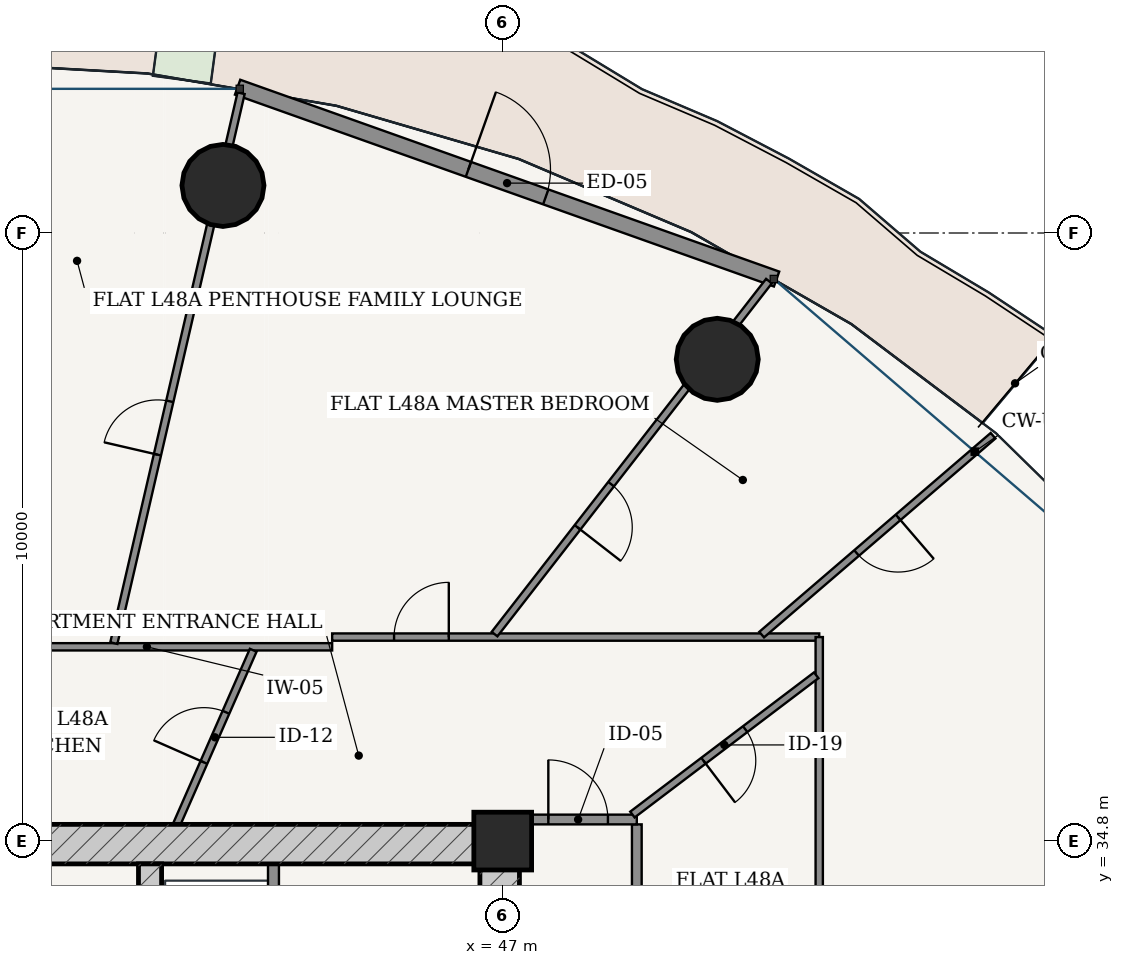
"""IFC4 building model, lengths in metres.
Left out: names, types, materials, properties, quantities, classifications, styles, units other than length and angle.
Written with IfcOpenShell. Run it as: python <this file> out.ifc"""

import sys

from ifc_helpers import new_model, si_unit, direction, frame, frame_2d, origin, origin_2d, place, context, subcontext, project, spatial, rectangle, hollow_circle, extrude, source, transform, mapped, element, fill, save


model = new_model("IFC4")
c1 = context("Model", 3, precision=1e-05, world=origin(), true_north=direction((-0.2419218956, 0.970295726276)))
c2 = subcontext(c1, "Body", "Model", "MODEL_VIEW")
j1 = project(units=[si_unit("LENGTHUNIT", "METRE"), si_unit("PLANEANGLEUNIT", "RADIAN")], contexts=[c1])
p1 = place(None, origin())
s1 = spatial("IfcSite", under=j1, at=p1, CompositionType="ELEMENT")
p2 = place(p1, origin())
s2 = spatial("IfcBuilding", under=s1, at=p2, CompositionType="ELEMENT")
p3 = place(p2, frame((0.0, 0.0, 182.2)))
s3 = spatial("IfcBuildingStorey", under=s2, at=p3, CompositionType="ELEMENT", Elevation=182.2)
p4 = place(p3, frame((47.0, 34.8, 0.0), z_axis=(0.0, 0.0, 1.0), x_axis=(1.0, 0.0, 0.0)))
e1 = element("IfcColumn", 1, at=p4, inside=s3, PredefinedType="COLUMN", context=c2, shape_type="SweptSolid", body=[
    extrude(rectangle(XDim=0.95, YDim=0.95, at=origin_2d()), origin(), (0.0, 0.0, 1.0), 3.6),
])
p5 = place(p3, frame((28.725, 34.75, 0.0), z_axis=(0.0, 0.0, 1.0), x_axis=(1.0, 0.0, 0.0)))
e2 = element("IfcWall", 2, at=p5, inside=s3, PredefinedType="SHEAR", context=c2, shape_type="SweptSolid", body=[
    extrude(rectangle(XDim=18.55, YDim=0.65, at=frame_2d((9.275, 0.0))), origin(), (0.0, 0.0, 1.0), 3.15),
])
p6 = place(p3, frame((46.95, 19.175, 0.0), z_axis=(0.0, 0.0, 1.0), x_axis=(0.0, 1.0, 0.0)))
e3 = element("IfcWall", 3, at=p6, inside=s3, PredefinedType="SHEAR", context=c2, shape_type="SweptSolid", body=[
    extrude(rectangle(XDim=15.25, YDim=0.65, at=frame_2d((7.625, 0.0))), origin(), (0.0, 0.0, 1.0), 3.15),
])
p7 = place(p6, frame((9.875, 0.0, 0.0)))
e4 = element("IfcOpeningElement", 4, at=p7, cuts=e3, PredefinedType="OPENING", context=c2, shape_type="SweptSolid", body=[
    extrude(rectangle(XDim=1.5, YDim=2.2, at=frame_2d((0.75, 1.1))), frame((0.0, 0.335, 0.0), z_axis=(0.0, -1.0, 0.0), x_axis=(1.0, 0.0, 0.0)), (0.0, 0.0, 1.0), 0.67),
])
p8 = place(p3, frame((41.2, 19.175, 0.0), z_axis=(0.0, 0.0, 1.0), x_axis=(0.0, 1.0, 0.0)))
e5 = element("IfcWall", 5, at=p8, inside=s3, PredefinedType="SHEAR", context=c2, shape_type="SweptSolid", body=[
    extrude(rectangle(XDim=15.25, YDim=0.38, at=frame_2d((7.625, 0.0))), origin(), (0.0, 0.0, 1.0), 3.15),
])
p9 = place(p8, frame((7.8, 0.0, 0.0)))
e6 = element("IfcOpeningElement", 6, at=p9, cuts=e5, PredefinedType="OPENING", context=c2, shape_type="SweptSolid", body=[
    extrude(rectangle(XDim=1.05, YDim=2.15, at=frame_2d((0.525, 1.075))), frame((0.0, 0.2, 0.0), z_axis=(0.0, -1.0, 0.0), x_axis=(1.0, 0.0, 0.0)), (0.0, 0.0, 1.0), 0.4),
])
for number, where, z_axis, x_axis in (
    (7, (50.528, 42.723, 0.0), (0.0, 0.0, 1.0), (1.0, 0.0, 0.0)),
    (8, (42.399, 45.582, 0.0), (0.0, 0.0, 1.0), (1.0, 0.0, 0.0)),
):
    element("IfcColumn", number, at=place(p3, frame(where, z_axis=z_axis, x_axis=x_axis)), inside=s3, PredefinedType="COLUMN", context=c2, shape_type="SweptSolid", body=[
        extrude(hollow_circle(Radius=0.675, WallThickness=0.042, at=origin_2d()), origin(), (0.0, 0.0, 1.0), 3.6),
    ])
p10 = place(p3, frame((51.503, 44.043, 0.0), z_axis=(0.0, 0.0, 1.0), x_axis=(-0.942095406405, 0.335344964522, 0.0)))
e9 = element("IfcWall", 9, at=p10, inside=s3, PredefinedType="SOLIDWALL", context=c2, shape_type="SweptSolid", body=[
    extrude(rectangle(XDim=9.408, YDim=0.26, at=frame_2d((4.704, 0.0))), origin(), (0.0, 0.0, 1.0), 3.15),
])
p11 = place(p10, frame((4.029, 0.0, 0.0)))
e10 = element("IfcOpeningElement", 10, at=p11, cuts=e9, PredefinedType="OPENING", context=c2, shape_type="SweptSolid", body=[
    extrude(rectangle(XDim=1.35, YDim=2.2, at=frame_2d((0.675, 1.1))), frame((0.0, 0.14, 0.0), z_axis=(0.0, -1.0, 0.0), x_axis=(1.0, 0.0, 0.0)), (0.0, 0.0, 1.0), 0.28),
])
p12 = place(p3, frame((43.23, 28.52, 0.0), z_axis=(0.0, 0.0, 1.0), x_axis=(0.0, 1.0, 0.0)))
e11 = element("IfcWall", 11, at=p12, inside=s3, PredefinedType="PARTITIONING", context=c2, shape_type="SweptSolid", body=[
    extrude(rectangle(XDim=5.905, YDim=0.18, at=frame_2d((2.953, 0.0))), origin(), (0.0, 0.0, 1.0), 3.15),
])
p13 = place(p12, frame((0.905, 0.0, 0.0)))
e12 = element("IfcOpeningElement", 12, at=p13, cuts=e11, PredefinedType="OPENING", context=c2, shape_type="SweptSolid", body=[
    extrude(rectangle(XDim=0.85, YDim=2.1, at=frame_2d((0.425, 1.05))), frame((0.0, 0.1, 0.0), z_axis=(0.0, -1.0, 0.0), x_axis=(1.0, 0.0, 0.0)), (0.0, 0.0, 1.0), 0.2),
])
p14 = place(p12, frame((3.655, 0.0, 0.0)))
e13 = element("IfcOpeningElement", 13, at=p14, cuts=e11, PredefinedType="OPENING", context=c2, shape_type="SweptSolid", body=[
    extrude(rectangle(XDim=1.15, YDim=2.2, at=frame_2d((0.575, 1.1))), frame((0.0, 0.1, 0.0), z_axis=(0.0, -1.0, 0.0), x_axis=(1.0, 0.0, 0.0)), (0.0, 0.0, 1.0), 0.2),
])
p15 = place(p3, frame((49.205, 16.675, 0.0), z_axis=(0.0, 0.0, 1.0), x_axis=(0.0, 1.0, 0.0)))
e14 = element("IfcWall", 14, at=p15, inside=s3, PredefinedType="PARTITIONING", context=c2, shape_type="SweptSolid", body=[
    extrude(rectangle(XDim=18.4, YDim=0.16, at=frame_2d((9.2, 0.0))), origin(), (0.0, 0.0, 1.0), 2.666),
])
p16 = place(p3, frame((47.275, 35.155, 0.0), z_axis=(0.0, 0.0, 1.0), x_axis=(1.0, 0.0, 0.0)))
e15 = element("IfcWall", 15, at=p16, inside=s3, PredefinedType="PARTITIONING", context=c2, shape_type="SweptSolid", body=[
    extrude(rectangle(XDim=1.93, YDim=0.16, at=frame_2d((0.965, 0.0))), origin(), (0.0, 0.0, 1.0), 3.15),
])
p17 = place(p16, frame((0.475, 0.0, 0.0)))
e16 = element("IfcOpeningElement", 16, at=p17, cuts=e15, PredefinedType="OPENING", context=c2, shape_type="SweptSolid", body=[
    extrude(rectangle(XDim=0.98, YDim=2.2, at=frame_2d((0.49, 1.1))), frame((0.0, 0.09, 0.0), z_axis=(0.0, -1.0, 0.0), x_axis=(1.0, 0.0, 0.0)), (0.0, 0.0, 1.0), 0.18),
])
p18 = place(p3, frame((38.102, 37.995, 0.0), z_axis=(0.0, 0.0, 1.0), x_axis=(1.0, 0.0, 0.0)))
e17 = element("IfcWall", 17, at=p18, inside=s3, PredefinedType="PARTITIONING", context=c2, shape_type="SweptSolid", body=[
    extrude(rectangle(XDim=6.093, YDim=0.12, at=frame_2d((3.046, 0.0))), origin(), (0.0, 0.0, 1.0), 2.666),
])
p19 = place(p3, frame((44.195, 38.155, 0.0), z_axis=(0.0, 0.0, 1.0), x_axis=(1.0, 0.0, 0.0)))
e18 = element("IfcWall", 18, at=p19, inside=s3, PredefinedType="PARTITIONING", context=c2, shape_type="SweptSolid", body=[
    extrude(rectangle(XDim=8.01, YDim=0.12, at=frame_2d((4.005, 0.0))), origin(), (0.0, 0.0, 1.0), 2.666),
])
p20 = place(p19, frame((1.018, 0.0, 0.0)))
e19 = element("IfcOpeningElement", 19, at=p20, cuts=e18, PredefinedType="OPENING", context=c2, shape_type="SweptSolid", body=[
    extrude(rectangle(XDim=0.9, YDim=2.15, at=frame_2d((0.45, 1.075))), frame((0.0, 0.07, 0.0), z_axis=(0.0, -1.0, 0.0), x_axis=(1.0, 0.0, 0.0)), (0.0, 0.0, 1.0), 0.14),
])
p21 = place(p3, frame((52.205, 38.155, 0.0), z_axis=(0.0, 0.0, 1.0), x_axis=(0.0, -1.0, 0.0)))
e20 = element("IfcWall", 20, at=p21, inside=s3, PredefinedType="PARTITIONING", context=c2, shape_type="SweptSolid", body=[
    extrude(rectangle(XDim=16.31, YDim=0.12, at=frame_2d((8.155, 0.0))), origin(), (0.0, 0.0, 1.0), 2.666),
])
p22 = place(p21, frame((13.574, 0.0, 0.0)))
e21 = element("IfcOpeningElement", 21, at=p22, cuts=e20, PredefinedType="OPENING", context=c2, shape_type="SweptSolid", body=[
    extrude(rectangle(XDim=0.9, YDim=2.15, at=frame_2d((0.45, 1.075))), frame((0.0, 0.07, 0.0), z_axis=(0.0, -1.0, 0.0), x_axis=(1.0, 0.0, 0.0)), (0.0, 0.0, 1.0), 0.14),
])
p23 = place(p21, frame((8.518, 0.0, 0.0)))
e22 = element("IfcOpeningElement", 22, at=p23, cuts=e20, PredefinedType="OPENING", context=c2, shape_type="SweptSolid", body=[
    extrude(rectangle(XDim=0.9, YDim=2.15, at=frame_2d((0.45, 1.075))), frame((0.0, 0.07, 0.0), z_axis=(0.0, -1.0, 0.0), x_axis=(1.0, 0.0, 0.0)), (0.0, 0.0, 1.0), 0.14),
])
p24 = place(p3, frame((51.258, 38.195, 0.0), z_axis=(0.0, 0.0, 1.0), x_axis=(0.758369880373, 0.651824458381, 0.0)))
e23 = element("IfcWall", 23, at=p24, inside=s3, PredefinedType="PARTITIONING", context=c2, shape_type="SweptSolid", body=[
    extrude(rectangle(XDim=5.018, YDim=0.12, at=frame_2d((2.509, 0.0))), origin(), (0.0, 0.0, 1.0), 2.666),
])
p25 = place(p24, frame((2.059, 0.0, 0.0)))
e24 = element("IfcOpeningElement", 24, at=p25, cuts=e23, PredefinedType="OPENING", context=c2, shape_type="SweptSolid", body=[
    extrude(rectangle(XDim=0.9, YDim=2.15, at=frame_2d((0.45, 1.075))), frame((0.0, 0.07, 0.0), z_axis=(0.0, -1.0, 0.0), x_axis=(1.0, 0.0, 0.0)), (0.0, 0.0, 1.0), 0.14),
])
p26 = place(p3, frame((46.865, 38.204, 0.0), z_axis=(0.0, 0.0, 1.0), x_axis=(0.613754405153, 0.789497010859, 0.0)))
e25 = element("IfcWall", 25, at=p26, inside=s3, PredefinedType="PARTITIONING", context=c2, shape_type="SweptSolid", body=[
    extrude(rectangle(XDim=7.353, YDim=0.12, at=frame_2d((3.677, 0.0))), origin(), (0.0, 0.0, 1.0), 2.5),
])
p27 = place(p26, frame((2.224, 0.0, 0.0)))
e26 = element("IfcOpeningElement", 26, at=p27, cuts=e25, PredefinedType="OPENING", context=c2, shape_type="SweptSolid", body=[
    extrude(rectangle(XDim=0.9, YDim=2.15, at=frame_2d((0.45, 1.075))), frame((0.0, 0.07, 0.0), z_axis=(0.0, -1.0, 0.0), x_axis=(1.0, 0.0, 0.0)), (0.0, 0.0, 1.0), 0.14),
])
p28 = place(p3, frame((40.605, 38.055, 0.0), z_axis=(0.0, 0.0, 1.0), x_axis=(0.225466493239, 0.974250922723, 0.0)))
e27 = element("IfcWall", 27, at=p28, inside=s3, PredefinedType="PARTITIONING", context=c2, shape_type="SweptSolid", body=[
    extrude(rectangle(XDim=9.282, YDim=0.12, at=frame_2d((4.641, 0.0))), origin(), (0.0, 0.0, 1.0), 2.5),
])
p29 = place(p28, frame((3.182, 0.0, 0.0)))
e28 = element("IfcOpeningElement", 28, at=p29, cuts=e27, PredefinedType="OPENING", context=c2, shape_type="SweptSolid", body=[
    extrude(rectangle(XDim=0.9, YDim=2.15, at=frame_2d((0.45, 1.075))), frame((0.0, 0.07, 0.0), z_axis=(0.0, -1.0, 0.0), x_axis=(1.0, 0.0, 0.0)), (0.0, 0.0, 1.0), 0.14),
])
p30 = place(p3, frame((49.133, 35.236, 0.0), z_axis=(0.0, 0.0, 1.0), x_axis=(0.797054583929, 0.603907269568, 0.0)))
e29 = element("IfcWall", 29, at=p30, inside=s3, PredefinedType="PARTITIONING", context=c2, shape_type="SweptSolid", body=[
    extrude(rectangle(XDim=3.792, YDim=0.12, at=frame_2d((1.896, 0.0))), origin(), (0.0, 0.0, 1.0), 2.825),
])
p31 = place(p30, frame((1.466, 0.0, 0.0)))
e30 = element("IfcOpeningElement", 30, at=p31, cuts=e29, PredefinedType="OPENING", context=c2, shape_type="SweptSolid", body=[
    extrude(rectangle(XDim=0.86, YDim=2.15, at=frame_2d((0.43, 1.075))), frame((0.0, 0.07, 0.0), z_axis=(0.0, -1.0, 0.0), x_axis=(1.0, 0.0, 0.0)), (0.0, 0.0, 1.0), 0.14),
])
p32 = place(p3, frame((41.638, 35.075, 0.0), z_axis=(0.0, 0.0, 1.0), x_axis=(0.402456087228, 0.915439292282, 0.0)))
e31 = element("IfcWall", 31, at=p32, inside=s3, PredefinedType="PARTITIONING", context=c2, shape_type="SweptSolid", body=[
    extrude(rectangle(XDim=3.128, YDim=0.12, at=frame_2d((1.564, 0.0))), origin(), (0.0, 0.0, 1.0), 3.15),
])
p33 = place(p32, frame((1.114, 0.0, 0.0)))
e32 = element("IfcOpeningElement", 32, at=p33, cuts=e31, PredefinedType="OPENING", context=c2, shape_type="SweptSolid", body=[
    extrude(rectangle(XDim=0.9, YDim=2.15, at=frame_2d((0.45, 1.075))), frame((0.0, 0.07, 0.0), z_axis=(0.0, -1.0, 0.0), x_axis=(1.0, 0.0, 0.0)), (0.0, 0.0, 1.0), 0.14),
])
m1 = source(origin(), c2, "Body", "SweptSolid", [
    extrude(rectangle(XDim=1.35, YDim=2.2, at=frame_2d((0.675, 1.1))), frame((0.0, 0.025, 0.0), z_axis=(0.0, -1.0, 0.0), x_axis=(1.0, 0.0, 0.0)), (0.0, 0.0, 1.0), 0.05),
])
p34 = place(p11, frame((1.35, 0.0, 0.0), z_axis=(0.0, 0.0, 1.0), x_axis=(-1.0, 0.0, 0.0)))
e33 = element("IfcDoor", 33, at=p34, inside=s3, OperationType="SINGLE_SWING_LEFT", PredefinedType="DOOR", context=c2, shape_type="MappedRepresentation", body=[
    mapped(m1, transform((0.0, 0.0, 0.0), scale=1.0)),
])
fill(e10, e33)
m2 = source(origin(), c2, "Body", "SweptSolid", [
    extrude(rectangle(XDim=0.98, YDim=2.2, at=frame_2d((0.49, 1.1))), frame((0.0, 0.025, 0.0), z_axis=(0.0, -1.0, 0.0), x_axis=(1.0, 0.0, 0.0)), (0.0, 0.0, 1.0), 0.05),
])
p35 = place(p17, origin())
e34 = element("IfcDoor", 34, at=p35, inside=s3, OperationType="SINGLE_SWING_LEFT", PredefinedType="DOOR", context=c2, shape_type="MappedRepresentation", body=[
    mapped(m2, transform((0.0, 0.0, 0.0), scale=1.0)),
])
fill(e16, e34)
m3 = source(origin(), c2, "Body", "SweptSolid", [
    extrude(rectangle(XDim=0.86, YDim=2.15, at=frame_2d((0.43, 1.075))), frame((0.0, 0.025, 0.0), z_axis=(0.0, -1.0, 0.0), x_axis=(1.0, 0.0, 0.0)), (0.0, 0.0, 1.0), 0.05),
])
p36 = place(p31, frame((0.86, 0.0, 0.0), z_axis=(0.0, 0.0, 1.0), x_axis=(-1.0, 0.0, 0.0)))
e35 = element("IfcDoor", 35, at=p36, inside=s3, OperationType="SINGLE_SWING_RIGHT", PredefinedType="DOOR", context=c2, shape_type="MappedRepresentation", body=[
    mapped(m3, transform((0.0, 0.0, 0.0), scale=1.0)),
])
fill(e30, e35)
m4 = source(origin(), c2, "Body", "SweptSolid", [
    extrude(rectangle(XDim=0.9, YDim=2.15, at=frame_2d((0.45, 1.075))), frame((0.0, 0.025, 0.0), z_axis=(0.0, -1.0, 0.0), x_axis=(1.0, 0.0, 0.0)), (0.0, 0.0, 1.0), 0.05),
])
p37 = place(p33, origin())
e36 = element("IfcDoor", 36, at=p37, inside=s3, OperationType="SINGLE_SWING_LEFT", PredefinedType="DOOR", context=c2, shape_type="MappedRepresentation", body=[
    mapped(m4, transform((0.0, 0.0, 0.0), scale=1.0)),
])
fill(e32, e36)
p38 = place(p20, origin())
e37 = element("IfcDoor", 37, at=p38, inside=s3, OperationType="SINGLE_SWING_RIGHT", PredefinedType="DOOR", context=c2, shape_type="MappedRepresentation", body=[
    mapped(m4, transform((0.0, 0.0, 0.0), scale=1.0)),
])
fill(e19, e37)
p39 = place(p29, origin())
e38 = element("IfcDoor", 38, at=p39, inside=s3, OperationType="SINGLE_SWING_LEFT", PredefinedType="DOOR", context=c2, shape_type="MappedRepresentation", body=[
    mapped(m4, transform((0.0, 0.0, 0.0), scale=1.0)),
])
fill(e28, e38)
p40 = place(p27, frame((0.9, 0.0, 0.0), z_axis=(0.0, 0.0, 1.0), x_axis=(-1.0, 0.0, 0.0)))
e39 = element("IfcDoor", 39, at=p40, inside=s3, OperationType="SINGLE_SWING_RIGHT", PredefinedType="DOOR", context=c2, shape_type="MappedRepresentation", body=[
    mapped(m4, transform((0.0, 0.0, 0.0), scale=1.0)),
])
fill(e26, e39)
p41 = place(p25, frame((0.9, 0.0, 0.0), z_axis=(0.0, 0.0, 1.0), x_axis=(-1.0, 0.0, 0.0)))
e40 = element("IfcDoor", 40, at=p41, inside=s3, OperationType="SINGLE_SWING_LEFT", PredefinedType="DOOR", context=c2, shape_type="MappedRepresentation", body=[
    mapped(m4, transform((0.0, 0.0, 0.0), scale=1.0)),
])
fill(e24, e40)
save(model, sys.argv[1])
